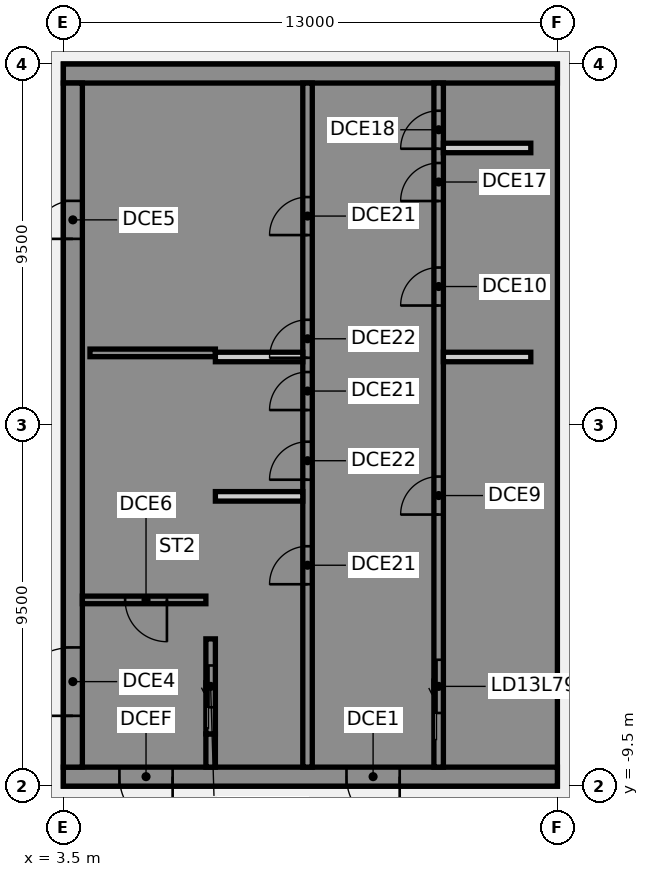
"""IFC4 building model, lengths in metres.
Left out: names, types, materials, properties, quantities, classifications, styles, units other than length and angle.
Written with IfcOpenShell. Run it as: python <this file> out.ifc"""

import sys

from ifc_helpers import new_model, si_unit, direction, frame, frame_2d, origin, place, context, subcontext, project, spatial, polyline, rectangle, outline, extrude, element, fill, save


model = new_model("IFC4")
c1 = context("Model", 3, precision=1e-05, world=origin(), true_north=direction((0.0, 1.0)))
c2 = subcontext(c1, "Body", "Model", "MODEL_VIEW")
j1 = project(units=[si_unit("LENGTHUNIT", "METRE"), si_unit("PLANEANGLEUNIT", "RADIAN")], contexts=[c1])
p1 = place(None, origin())
s1 = spatial("IfcSite", under=j1, at=p1, CompositionType="ELEMENT")
p2 = place(p1, origin())
s2 = spatial("IfcBuilding", under=s1, at=p2, CompositionType="ELEMENT")
p3 = place(p2, frame((0.0, 0.0, 321.4)))
s3 = spatial("IfcBuildingStorey", under=s2, at=p3, CompositionType="ELEMENT", Elevation=321.4)
p4 = place(p3, frame((16.5, -9.25, 0.0), z_axis=(0.0, 0.0, 1.0), x_axis=(-1.0, 0.0, 0.0)))
e1 = element("IfcWall", 1, at=p4, inside=s3, PredefinedType="SHEAR", context=c2, shape_type="SweptSolid", body=[
    extrude(rectangle(XDim=13.0, YDim=0.5, at=frame_2d((6.5, 0.0))), origin(), (0.0, 0.0, 1.0), 3.82),
])
p5 = place(p4, frame((4.15, 0.0, 0.0)))
e2 = element("IfcOpeningElement", 2, at=p5, cuts=e1, PredefinedType="OPENING", context=c2, shape_type="SweptSolid", body=[
    extrude(rectangle(XDim=1.4, YDim=2.1, at=frame_2d((0.7, 1.05))), frame((0.0, 0.26, 0.0), z_axis=(0.0, -1.0, 0.0), x_axis=(1.0, 0.0, 0.0)), (0.0, 0.0, 1.0), 0.52),
])
p6 = place(p4, frame((10.125, 0.0, 0.0)))
e3 = element("IfcOpeningElement", 3, at=p6, cuts=e1, PredefinedType="OPENING", context=c2, shape_type="SweptSolid", body=[
    extrude(rectangle(XDim=1.4, YDim=2.1, at=frame_2d((0.7, 1.05))), frame((0.0, 0.26, 0.0), z_axis=(0.0, -1.0, 0.0), x_axis=(1.0, 0.0, 0.0)), (0.0, 0.0, 1.0), 0.52),
])
p7 = place(p3, origin())
e4 = element("IfcWall", 4, at=p7, inside=s3, PredefinedType="SHEAR", context=c2, shape_type="SweptSolid", body=[
    extrude(outline(polyline([(13.5, -8.125), (13.5, -9.0), (16.0, -9.0), (16.5, -9.0), (16.5, 9.0), (16.0, 9.0), (13.5, 9.0), (13.5, 8.125), (16.0, 8.125), (16.0, -5.375), (13.5, -5.375), (13.5, -5.625), (16.0, -5.625), (16.0, -8.125), (13.5, -8.125)])), origin(), (0.0, 0.0, 1.0), 3.82),
])
p8 = place(p3, frame((16.5, 9.25, 0.0), z_axis=(0.0, 0.0, 1.0), x_axis=(-1.0, 0.0, 0.0)))
e5 = element("IfcWall", 5, at=p8, inside=s3, PredefinedType="SHEAR", context=c2, shape_type="SweptSolid", body=[
    extrude(rectangle(XDim=13.0, YDim=0.5, at=frame_2d((6.5, 0.0))), origin(), (0.0, 0.0, 1.0), 3.82),
])
p9 = place(p3, origin())
e6 = element("IfcWall", 6, at=p9, inside=s3, PredefinedType="SHEAR", context=c2, shape_type="SweptSolid", body=[
    extrude(outline(polyline([(9.8, -5.625), (9.8, -5.375), (7.5, -5.375), (7.5, 8.125), (9.8, 8.125), (9.8, 9.0), (7.5, 9.0), (7.25, 9.0), (7.25, -5.625), (7.5, -5.625), (9.8, -5.625)])), origin(), (0.0, 0.0, 1.0), 3.82),
])
p10 = place(p3, origin())
e7 = element("IfcWall", 7, at=p10, inside=s3, PredefinedType="SHEAR", context=c2, shape_type="SweptSolid", body=[
    extrude(outline(polyline([(7.5, -8.125), (7.5, -9.0), (9.8, -9.0), (9.8, -8.125), (9.8, -5.625), (9.55, -5.625), (9.55, -8.125), (7.5, -8.125)])), origin(), (0.0, 0.0, 1.0), 3.82),
])
p11 = place(p3, frame((7.375, -9.0, 0.0), z_axis=(0.0, 0.0, 1.0), x_axis=(0.0, 1.0, 0.0)))
e8 = element("IfcWall", 8, at=p11, inside=s3, PredefinedType="SHEAR", context=c2, shape_type="SweptSolid", body=[
    extrude(rectangle(XDim=0.875, YDim=0.25, at=frame_2d((0.438, 0.0))), origin(), (0.0, 0.0, 1.0), 3.82),
])
p12 = place(p3, frame((7.5, 1.9, 0.0), z_axis=(0.0, 0.0, 1.0), x_axis=(-1.0, 0.0, 0.0)))
e9 = element("IfcWall", 9, at=p12, inside=s3, PredefinedType="SHEAR", context=c2, shape_type="SweptSolid", body=[
    extrude(rectangle(XDim=3.3, YDim=0.2, at=frame_2d((1.65, 0.0))), origin(), (0.0, 0.0, 1.0), 3.82),
])
p13 = place(p3, frame((13.375, -9.0, 0.0), z_axis=(0.0, 0.0, 1.0), x_axis=(0.0, 1.0, 0.0)))
e10 = element("IfcWall", 10, at=p13, inside=s3, PredefinedType="SHEAR", context=c2, shape_type="SweptSolid", body=[
    extrude(rectangle(XDim=18.0, YDim=0.25, at=frame_2d((9.0, 0.0))), origin(), (0.0, 0.0, 1.0), 3.82),
])
p14 = place(p13, frame((1.425, 0.0, 0.0)))
e11 = element("IfcOpeningElement", 11, at=p14, cuts=e10, PredefinedType="OPENING", context=c2, shape_type="SweptSolid", body=[
    extrude(rectangle(XDim=1.4, YDim=2.1, at=frame_2d((0.7, 1.05))), frame((0.0, 0.135, 0.0), z_axis=(0.0, -1.0, 0.0), x_axis=(1.0, 0.0, 0.0)), (0.0, 0.0, 1.0), 0.27),
])
p15 = place(p13, frame((6.646, 0.0, 0.0)))
e12 = element("IfcOpeningElement", 12, at=p15, cuts=e10, PredefinedType="OPENING", context=c2, shape_type="SweptSolid", body=[
    extrude(rectangle(XDim=1.0, YDim=2.1, at=frame_2d((0.5, 1.05))), frame((0.0, 0.135, 0.0), z_axis=(0.0, -1.0, 0.0), x_axis=(1.0, 0.0, 0.0)), (0.0, 0.0, 1.0), 0.27),
])
p16 = place(p13, frame((12.146, 0.0, 0.0)))
e13 = element("IfcOpeningElement", 13, at=p16, cuts=e10, PredefinedType="OPENING", context=c2, shape_type="SweptSolid", body=[
    extrude(rectangle(XDim=1.0, YDim=2.1, at=frame_2d((0.5, 1.05))), frame((0.0, 0.135, 0.0), z_axis=(0.0, -1.0, 0.0), x_axis=(1.0, 0.0, 0.0)), (0.0, 0.0, 1.0), 0.27),
])
p17 = place(p13, frame((14.896, 0.0, 0.0)))
e14 = element("IfcOpeningElement", 14, at=p17, cuts=e10, PredefinedType="OPENING", context=c2, shape_type="SweptSolid", body=[
    extrude(rectangle(XDim=1.0, YDim=2.1, at=frame_2d((0.5, 1.05))), frame((0.0, 0.135, 0.0), z_axis=(0.0, -1.0, 0.0), x_axis=(1.0, 0.0, 0.0)), (0.0, 0.0, 1.0), 0.27),
])
p18 = place(p13, frame((16.271, 0.0, 0.0)))
e15 = element("IfcOpeningElement", 15, at=p18, cuts=e10, PredefinedType="OPENING", context=c2, shape_type="SweptSolid", body=[
    extrude(rectangle(XDim=1.0, YDim=2.1, at=frame_2d((0.5, 1.05))), frame((0.0, 0.135, 0.0), z_axis=(0.0, -1.0, 0.0), x_axis=(1.0, 0.0, 0.0)), (0.0, 0.0, 1.0), 0.27),
])
p19 = place(p3, frame((9.925, -9.0, 0.0), z_axis=(0.0, 0.0, 1.0), x_axis=(0.0, 1.0, 0.0)))
e16 = element("IfcWall", 16, at=p19, inside=s3, PredefinedType="SHEAR", context=c2, shape_type="SweptSolid", body=[
    extrude(rectangle(XDim=18.0, YDim=0.25, at=frame_2d((9.0, 0.0))), origin(), (0.0, 0.0, 1.0), 3.82),
])
p20 = place(p19, frame((4.812, 0.0, 0.0)))
e17 = element("IfcOpeningElement", 17, at=p20, cuts=e16, PredefinedType="OPENING", context=c2, shape_type="SweptSolid", body=[
    extrude(rectangle(XDim=1.0, YDim=2.1, at=frame_2d((0.5, 1.05))), frame((0.0, 0.135, 0.0), z_axis=(0.0, -1.0, 0.0), x_axis=(1.0, 0.0, 0.0)), (0.0, 0.0, 1.0), 0.27),
])
p21 = place(p19, frame((7.562, 0.0, 0.0)))
e18 = element("IfcOpeningElement", 18, at=p21, cuts=e16, PredefinedType="OPENING", context=c2, shape_type="SweptSolid", body=[
    extrude(rectangle(XDim=1.0, YDim=2.1, at=frame_2d((0.5, 1.05))), frame((0.0, 0.135, 0.0), z_axis=(0.0, -1.0, 0.0), x_axis=(1.0, 0.0, 0.0)), (0.0, 0.0, 1.0), 0.27),
])
p22 = place(p19, frame((9.396, 0.0, 0.0)))
e19 = element("IfcOpeningElement", 19, at=p22, cuts=e16, PredefinedType="OPENING", context=c2, shape_type="SweptSolid", body=[
    extrude(rectangle(XDim=1.0, YDim=2.1, at=frame_2d((0.5, 1.05))), frame((0.0, 0.135, 0.0), z_axis=(0.0, -1.0, 0.0), x_axis=(1.0, 0.0, 0.0)), (0.0, 0.0, 1.0), 0.27),
])
p23 = place(p19, frame((10.771, 0.0, 0.0)))
e20 = element("IfcOpeningElement", 20, at=p23, cuts=e16, PredefinedType="OPENING", context=c2, shape_type="SweptSolid", body=[
    extrude(rectangle(XDim=1.0, YDim=2.1, at=frame_2d((0.5, 1.05))), frame((0.0, 0.135, 0.0), z_axis=(0.0, -1.0, 0.0), x_axis=(1.0, 0.0, 0.0)), (0.0, 0.0, 1.0), 0.27),
])
p24 = place(p19, frame((14.0, 0.0, 0.0)))
e21 = element("IfcOpeningElement", 21, at=p24, cuts=e16, PredefinedType="OPENING", context=c2, shape_type="SweptSolid", body=[
    extrude(rectangle(XDim=1.0, YDim=2.1, at=frame_2d((0.5, 1.05))), frame((0.0, 0.135, 0.0), z_axis=(0.0, -1.0, 0.0), x_axis=(1.0, 0.0, 0.0)), (0.0, 0.0, 1.0), 0.27),
])
p25 = place(p3, frame((7.375, -8.125, 0.0), z_axis=(0.0, 0.0, 1.0), x_axis=(0.0, 1.0, 0.0)))
e22 = element("IfcWall", 22, at=p25, inside=s3, PredefinedType="SHEAR", context=c2, shape_type="SweptSolid", body=[
    extrude(rectangle(XDim=2.5, YDim=0.25, at=frame_2d((1.25, 0.0))), origin(), (0.0, 0.0, 1.0), 3.82),
])
p26 = place(p25, frame((0.7, 0.0, 0.0)))
e23 = element("IfcOpeningElement", 23, at=p26, cuts=e22, PredefinedType="OPENING", context=c2, shape_type="SweptSolid", body=[
    extrude(rectangle(XDim=1.1, YDim=2.1, at=frame_2d((0.55, 1.05))), frame((0.0, 0.135, 0.0), z_axis=(0.0, -1.0, 0.0), x_axis=(1.0, 0.0, 0.0)), (0.0, 0.0, 1.0), 0.27),
])
p27 = place(p3, frame((3.75, -9.0, 0.0), z_axis=(0.0, 0.0, 1.0), x_axis=(0.0, 1.0, 0.0)))
e24 = element("IfcWall", 24, at=p27, inside=s3, PredefinedType="SHEAR", context=c2, shape_type="SweptSolid", body=[
    extrude(rectangle(XDim=18.0, YDim=0.5, at=frame_2d((9.0, 0.0))), origin(), (0.0, 0.0, 1.0), 3.82),
])
p28 = place(p27, frame((1.35, 0.0, 0.0)))
e25 = element("IfcOpeningElement", 25, at=p28, cuts=e24, PredefinedType="OPENING", context=c2, shape_type="SweptSolid", body=[
    extrude(rectangle(XDim=1.8, YDim=2.1, at=frame_2d((0.9, 1.05))), frame((0.0, 0.26, 0.0), z_axis=(0.0, -1.0, 0.0), x_axis=(1.0, 0.0, 0.0)), (0.0, 0.0, 1.0), 0.52),
])
p29 = place(p27, frame((13.9, 0.0, 0.0)))
e26 = element("IfcOpeningElement", 26, at=p29, cuts=e24, PredefinedType="OPENING", context=c2, shape_type="SweptSolid", body=[
    extrude(rectangle(XDim=1.0, YDim=2.1, at=frame_2d((0.5, 1.05))), frame((0.0, 0.26, 0.0), z_axis=(0.0, -1.0, 0.0), x_axis=(1.0, 0.0, 0.0)), (0.0, 0.0, 1.0), 0.52),
])
p30 = place(p3, frame((7.25, -4.6, 0.0), z_axis=(0.0, 0.0, 1.0), x_axis=(-1.0, 0.0, 0.0)))
e27 = element("IfcWall", 27, at=p30, inside=s3, PredefinedType="SHEAR", context=c2, shape_type="SweptSolid", body=[
    extrude(rectangle(XDim=3.25, YDim=0.2, at=frame_2d((1.625, 0.0))), origin(), (0.0, 0.0, 1.0), 3.82),
])
p31 = place(p30, frame((1.025, 0.0, 0.0)))
e28 = element("IfcOpeningElement", 28, at=p31, cuts=e27, PredefinedType="OPENING", context=c2, shape_type="SweptSolid", body=[
    extrude(rectangle(XDim=1.1, YDim=2.1, at=frame_2d((0.55, 1.05))), frame((0.0, 0.11, 0.0), z_axis=(0.0, -1.0, 0.0), x_axis=(1.0, 0.0, 0.0)), (0.0, 0.0, 1.0), 0.22),
])
for number, where, z_axis, x_axis in (
    (29, (15.8, 1.792, 0.0), (0.0, 0.0, 1.0), (-1.0, 0.0, 0.0)),
    (30, (15.8, 7.292, 0.0), (0.0, 0.0, 1.0), (-1.0, 0.0, 0.0)),
    (31, (9.8, -1.875, 0.0), (0.0, 0.0, 1.0), (-1.0, 0.0, 0.0)),
    (32, (9.8, 1.792, 0.0), (0.0, 0.0, 1.0), (-1.0, 0.0, 0.0)),
):
    element("IfcWall", number, at=place(p3, frame(where, z_axis=z_axis, x_axis=x_axis)), inside=s3, PredefinedType="PARTITIONING", context=c2, shape_type="SweptSolid", body=[
        extrude(rectangle(XDim=2.3, YDim=0.25, at=frame_2d((1.15, 0.0))), origin(), (0.0, 0.0, 1.0), 3.82),
    ])
p32 = place(p5, origin())
e33 = element("IfcDoor", 33, at=p32, inside=s3, OperationType="SINGLE_SWING_LEFT", PredefinedType="DOOR", context=c2, shape_type="SweptSolid", body=[
    extrude(rectangle(XDim=1.4, YDim=2.1, at=frame_2d((0.7, 1.05))), frame((0.0, 0.025, 0.0), z_axis=(0.0, -1.0, 0.0), x_axis=(1.0, 0.0, 0.0)), (0.0, 0.0, 1.0), 0.05),
])
fill(e2, e33)
p33 = place(p6, origin())
e34 = element("IfcDoor", 34, at=p33, inside=s3, OperationType="SINGLE_SWING_LEFT", PredefinedType="DOOR", context=c2, shape_type="SweptSolid", body=[
    extrude(rectangle(XDim=1.4, YDim=2.1, at=frame_2d((0.7, 1.05))), frame((0.0, 0.025, 0.0), z_axis=(0.0, -1.0, 0.0), x_axis=(1.0, 0.0, 0.0)), (0.0, 0.0, 1.0), 0.05),
])
fill(e3, e34)
p34 = place(p28, origin())
e35 = element("IfcDoor", 35, at=p34, inside=s3, OperationType="SINGLE_SWING_LEFT", PredefinedType="DOOR", context=c2, shape_type="SweptSolid", body=[
    extrude(rectangle(XDim=1.8, YDim=2.1, at=frame_2d((0.9, 1.05))), frame((0.0, 0.025, 0.0), z_axis=(0.0, -1.0, 0.0), x_axis=(1.0, 0.0, 0.0)), (0.0, 0.0, 1.0), 0.05),
])
fill(e25, e35)
p35 = place(p29, origin())
e36 = element("IfcDoor", 36, at=p35, inside=s3, OperationType="SINGLE_SWING_LEFT", PredefinedType="DOOR", context=c2, shape_type="SweptSolid", body=[
    extrude(rectangle(XDim=1.0, YDim=2.1, at=frame_2d((0.5, 1.05))), frame((0.0, 0.025, 0.0), z_axis=(0.0, -1.0, 0.0), x_axis=(1.0, 0.0, 0.0)), (0.0, 0.0, 1.0), 0.05),
])
fill(e26, e36)
p36 = place(p31, origin())
e37 = element("IfcDoor", 37, at=p36, inside=s3, OperationType="SINGLE_SWING_LEFT", PredefinedType="DOOR", context=c2, shape_type="SweptSolid", body=[
    extrude(rectangle(XDim=1.1, YDim=2.1, at=frame_2d((0.55, 1.05))), frame((0.0, 0.025, 0.0), z_axis=(0.0, -1.0, 0.0), x_axis=(1.0, 0.0, 0.0)), (0.0, 0.0, 1.0), 0.05),
])
fill(e28, e37)
p37 = place(p14, origin())
e38 = element("IfcDoor", 38, at=p37, inside=s3, OperationType="SLIDING_TO_LEFT", PredefinedType="DOOR", context=c2, shape_type="SweptSolid", body=[
    extrude(rectangle(XDim=1.4, YDim=2.1, at=frame_2d((0.7, 1.05))), frame((0.0, 0.025, 0.0), z_axis=(0.0, -1.0, 0.0), x_axis=(1.0, 0.0, 0.0)), (0.0, 0.0, 1.0), 0.05),
])
fill(e11, e38)
p38 = place(p26, origin())
e39 = element("IfcDoor", 39, at=p38, inside=s3, OperationType="SLIDING_TO_LEFT", PredefinedType="DOOR", context=c2, shape_type="SweptSolid", body=[
    extrude(rectangle(XDim=1.1, YDim=2.1, at=frame_2d((0.55, 1.05))), frame((0.0, 0.025, 0.0), z_axis=(0.0, -1.0, 0.0), x_axis=(1.0, 0.0, 0.0)), (0.0, 0.0, 1.0), 0.05),
])
fill(e23, e39)
p39 = place(p15, origin())
e40 = element("IfcDoor", 40, at=p39, inside=s3, OperationType="SINGLE_SWING_LEFT", PredefinedType="DOOR", context=c2, shape_type="SweptSolid", body=[
    extrude(rectangle(XDim=1.0, YDim=2.1, at=frame_2d((0.5, 1.05))), frame((0.0, 0.025, 0.0), z_axis=(0.0, -1.0, 0.0), x_axis=(1.0, 0.0, 0.0)), (0.0, 0.0, 1.0), 0.05),
])
fill(e12, e40)
p40 = place(p16, origin())
e41 = element("IfcDoor", 41, at=p40, inside=s3, OperationType="SINGLE_SWING_LEFT", PredefinedType="DOOR", context=c2, shape_type="SweptSolid", body=[
    extrude(rectangle(XDim=1.0, YDim=2.1, at=frame_2d((0.5, 1.05))), frame((0.0, 0.025, 0.0), z_axis=(0.0, -1.0, 0.0), x_axis=(1.0, 0.0, 0.0)), (0.0, 0.0, 1.0), 0.05),
])
fill(e13, e41)
p41 = place(p17, origin())
e42 = element("IfcDoor", 42, at=p41, inside=s3, OperationType="SINGLE_SWING_LEFT", PredefinedType="DOOR", context=c2, shape_type="SweptSolid", body=[
    extrude(rectangle(XDim=1.0, YDim=2.1, at=frame_2d((0.5, 1.05))), frame((0.0, 0.025, 0.0), z_axis=(0.0, -1.0, 0.0), x_axis=(1.0, 0.0, 0.0)), (0.0, 0.0, 1.0), 0.05),
])
fill(e14, e42)
p42 = place(p18, origin())
e43 = element("IfcDoor", 43, at=p42, inside=s3, OperationType="SINGLE_SWING_LEFT", PredefinedType="DOOR", context=c2, shape_type="SweptSolid", body=[
    extrude(rectangle(XDim=1.0, YDim=2.1, at=frame_2d((0.5, 1.05))), frame((0.0, 0.025, 0.0), z_axis=(0.0, -1.0, 0.0), x_axis=(1.0, 0.0, 0.0)), (0.0, 0.0, 1.0), 0.05),
])
fill(e15, e43)
p43 = place(p20, origin())
e44 = element("IfcDoor", 44, at=p43, inside=s3, OperationType="SINGLE_SWING_LEFT", PredefinedType="DOOR", context=c2, shape_type="SweptSolid", body=[
    extrude(rectangle(XDim=1.0, YDim=2.1, at=frame_2d((0.5, 1.05))), frame((0.0, 0.025, 0.0), z_axis=(0.0, -1.0, 0.0), x_axis=(1.0, 0.0, 0.0)), (0.0, 0.0, 1.0), 0.05),
])
fill(e17, e44)
p44 = place(p21, origin())
e45 = element("IfcDoor", 45, at=p44, inside=s3, OperationType="SINGLE_SWING_LEFT", PredefinedType="DOOR", context=c2, shape_type="SweptSolid", body=[
    extrude(rectangle(XDim=1.0, YDim=2.1, at=frame_2d((0.5, 1.05))), frame((0.0, 0.025, 0.0), z_axis=(0.0, -1.0, 0.0), x_axis=(1.0, 0.0, 0.0)), (0.0, 0.0, 1.0), 0.05),
])
fill(e18, e45)
p45 = place(p22, origin())
e46 = element("IfcDoor", 46, at=p45, inside=s3, OperationType="SINGLE_SWING_LEFT", PredefinedType="DOOR", context=c2, shape_type="SweptSolid", body=[
    extrude(rectangle(XDim=1.0, YDim=2.1, at=frame_2d((0.5, 1.05))), frame((0.0, 0.025, 0.0), z_axis=(0.0, -1.0, 0.0), x_axis=(1.0, 0.0, 0.0)), (0.0, 0.0, 1.0), 0.05),
])
fill(e19, e46)
p46 = place(p23, origin())
e47 = element("IfcDoor", 47, at=p46, inside=s3, OperationType="SINGLE_SWING_LEFT", PredefinedType="DOOR", context=c2, shape_type="SweptSolid", body=[
    extrude(rectangle(XDim=1.0, YDim=2.1, at=frame_2d((0.5, 1.05))), frame((0.0, 0.025, 0.0), z_axis=(0.0, -1.0, 0.0), x_axis=(1.0, 0.0, 0.0)), (0.0, 0.0, 1.0), 0.05),
])
fill(e20, e47)
p47 = place(p24, origin())
e48 = element("IfcDoor", 48, at=p47, inside=s3, OperationType="SINGLE_SWING_LEFT", PredefinedType="DOOR", context=c2, shape_type="SweptSolid", body=[
    extrude(rectangle(XDim=1.0, YDim=2.1, at=frame_2d((0.5, 1.05))), frame((0.0, 0.025, 0.0), z_axis=(0.0, -1.0, 0.0), x_axis=(1.0, 0.0, 0.0)), (0.0, 0.0, 1.0), 0.05),
])
fill(e21, e48)
save(model, sys.argv[1])
